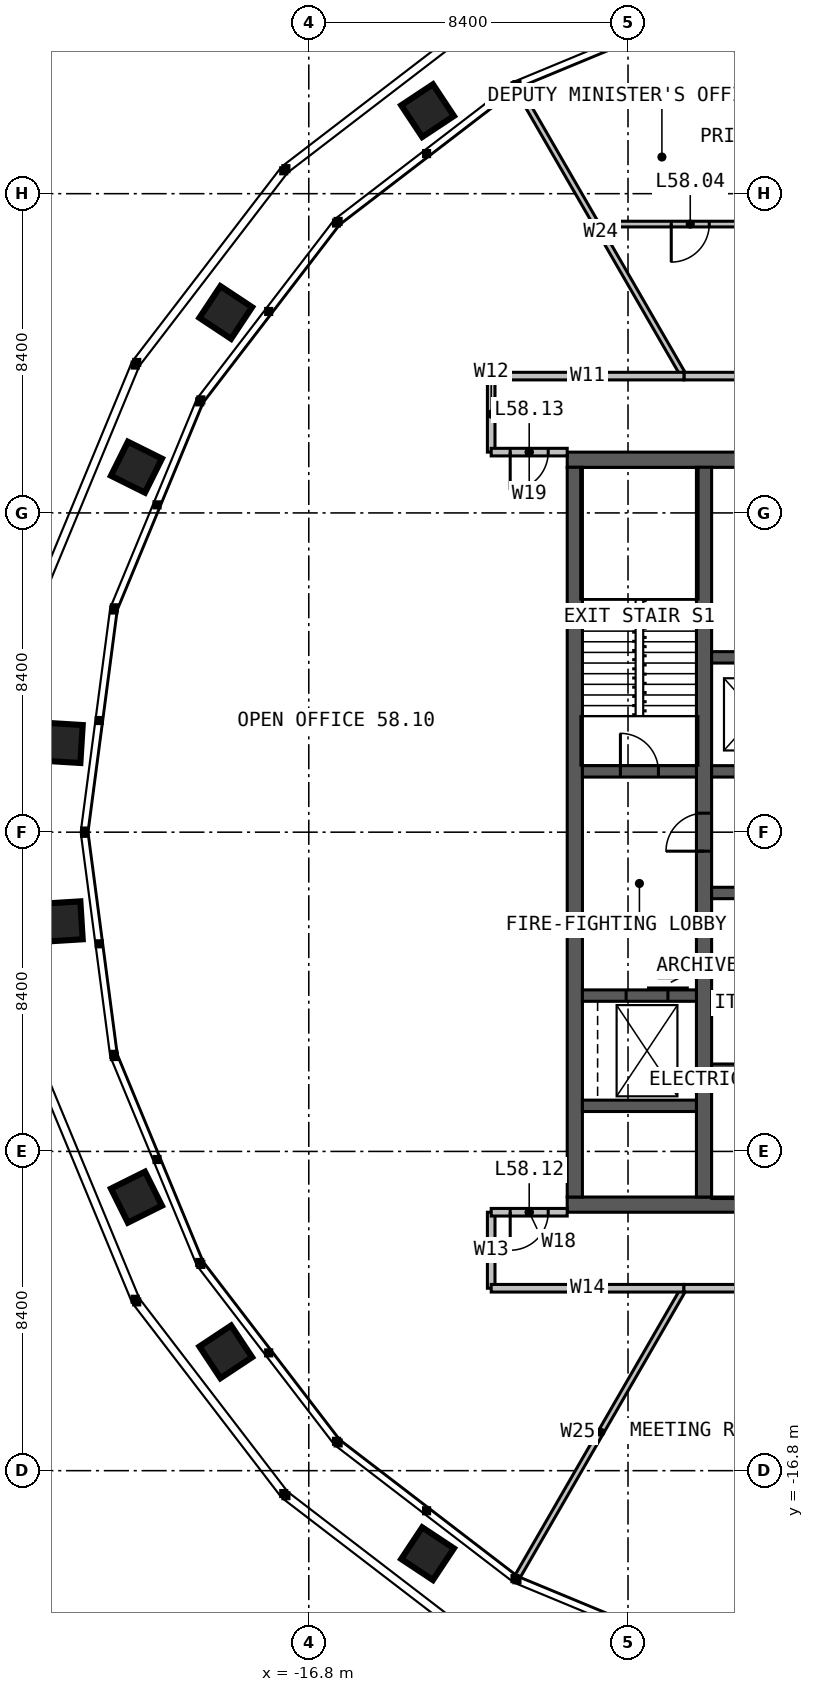
"""IFC4 building model, lengths in metres.
Left out: names, types, materials, properties, quantities, classifications, styles, units other than length and angle.
Written with IfcOpenShell. Run it as: python <this file> out.ifc"""

import sys

from ifc_helpers import new_model, si_unit, direction, frame, frame_2d, origin, place, context, subcontext, project, spatial, rectangle, extrude, element, fill, save


model = new_model("IFC4")
c1 = context("Model", 3, precision=1e-05, world=origin(), true_north=direction((0.0, 1.0)))
c2 = subcontext(c1, "Body", "Model", "MODEL_VIEW")
j1 = project(units=[si_unit("LENGTHUNIT", "METRE"), si_unit("PLANEANGLEUNIT", "RADIAN")], contexts=[c1])
p1 = place(None, origin())
s1 = spatial("IfcSite", under=j1, at=p1, CompositionType="ELEMENT")
p2 = place(p1, origin())
s2 = spatial("IfcBuilding", under=s1, at=p2, CompositionType="ELEMENT")
p3 = place(p2, frame((0.0, 0.0, 240.0)))
s3 = spatial("IfcBuildingStorey", under=s2, at=p3, CompositionType="ELEMENT", Elevation=240.0)
p4 = place(p3, frame((-10.0, 9.8, 0.0), z_axis=(0.0, 0.0, 1.0), x_axis=(1.0, 0.0, 0.0)))
e1 = element("IfcWall", 1, at=p4, inside=s3, PredefinedType="SOLIDWALL", context=c2, shape_type="SweptSolid", body=[
    extrude(rectangle(XDim=20.0, YDim=0.4, at=frame_2d((10.0, 0.0))), origin(), (0.0, 0.0, 1.0), 4.0),
])
p5 = place(p4, frame((9.4, 0.0, 0.0)))
e2 = element("IfcOpeningElement", 2, at=p5, cuts=e1, PredefinedType="OPENING", context=c2, shape_type="SweptSolid", body=[
    extrude(rectangle(XDim=1.2, YDim=2.2, at=frame_2d((0.6, 1.1))), frame((0.0, 0.21, 0.0), z_axis=(0.0, -1.0, 0.0), x_axis=(1.0, 0.0, 0.0)), (0.0, 0.0, 1.0), 0.42),
])
p6 = place(p3, frame((10.0, -9.8, 0.0), z_axis=(0.0, 0.0, 1.0), x_axis=(-1.0, 0.0, 0.0)))
e3 = element("IfcWall", 3, at=p6, inside=s3, PredefinedType="SOLIDWALL", context=c2, shape_type="SweptSolid", body=[
    extrude(rectangle(XDim=20.0, YDim=0.4, at=frame_2d((10.0, 0.0))), origin(), (0.0, 0.0, 1.0), 4.0),
])
p7 = place(p6, frame((6.875, 0.0, 0.0)))
e4 = element("IfcOpeningElement", 4, at=p7, cuts=e3, PredefinedType="OPENING", context=c2, shape_type="SweptSolid", body=[
    extrude(rectangle(XDim=1.2, YDim=2.2, at=frame_2d((0.6, 1.1))), frame((0.0, 0.21, 0.0), z_axis=(0.0, -1.0, 0.0), x_axis=(1.0, 0.0, 0.0)), (0.0, 0.0, 1.0), 0.42),
])
p8 = place(p3, frame((-9.8, 9.6, 0.0), z_axis=(0.0, 0.0, 1.0), x_axis=(0.0, -1.0, 0.0)))
e5 = element("IfcWall", 5, at=p8, inside=s3, PredefinedType="SOLIDWALL", context=c2, shape_type="SweptSolid", body=[
    extrude(rectangle(XDim=19.2, YDim=0.4, at=frame_2d((9.6, 0.0))), origin(), (0.0, 0.0, 1.0), 4.0),
])
p9 = place(p3, frame((-6.4, -9.6, 0.0), z_axis=(0.0, 0.0, 1.0), x_axis=(0.0, 1.0, 0.0)))
e6 = element("IfcWall", 6, at=p9, inside=s3, PredefinedType="SOLIDWALL", context=c2, shape_type="SweptSolid", body=[
    extrude(rectangle(XDim=19.2, YDim=0.4, at=frame_2d((9.6, 0.0))), origin(), (0.0, 0.0, 1.0), 4.0),
])
p10 = place(p9, frame((9.1, 0.0, 0.0)))
e7 = element("IfcOpeningElement", 7, at=p10, cuts=e6, PredefinedType="OPENING", context=c2, shape_type="SweptSolid", body=[
    extrude(rectangle(XDim=1.0, YDim=2.2, at=frame_2d((0.5, 1.1))), frame((0.0, 0.21, 0.0), z_axis=(0.0, -1.0, 0.0), x_axis=(1.0, 0.0, 0.0)), (0.0, 0.0, 1.0), 0.42),
])
p11 = place(p3, frame((-6.2, 1.6, 0.0), z_axis=(0.0, 0.0, 1.0), x_axis=(1.0, 0.0, 0.0)))
e8 = element("IfcWall", 8, at=p11, inside=s3, PredefinedType="SOLIDWALL", context=c2, shape_type="SweptSolid", body=[
    extrude(rectangle(XDim=4.85, YDim=0.3, at=frame_2d((2.425, 0.0))), origin(), (0.0, 0.0, 1.0), 4.0),
])
p12 = place(p11, frame((0.625, 0.0, 0.0)))
e9 = element("IfcOpeningElement", 9, at=p12, cuts=e8, PredefinedType="OPENING", context=c2, shape_type="SweptSolid", body=[
    extrude(rectangle(XDim=1.1, YDim=2.2, at=frame_2d((0.55, 1.1))), frame((0.0, 0.16, 0.0), z_axis=(0.0, -1.0, 0.0), x_axis=(1.0, 0.0, 0.0)), (0.0, 0.0, 1.0), 0.32),
])
p13 = place(p11, frame((3.15, 0.0, 0.0)))
e10 = element("IfcOpeningElement", 10, at=p13, cuts=e8, PredefinedType="OPENING", context=c2, shape_type="SweptSolid", body=[
    extrude(rectangle(XDim=1.1, YDim=2.2, at=frame_2d((0.55, 1.1))), frame((0.0, 0.16, 0.0), z_axis=(0.0, -1.0, 0.0), x_axis=(1.0, 0.0, 0.0)), (0.0, 0.0, 1.0), 0.32),
])
p14 = place(p3, frame((-6.2, 4.6, 0.0), z_axis=(0.0, 0.0, 1.0), x_axis=(1.0, 0.0, 0.0)))
e11 = element("IfcWall", 11, at=p14, inside=s3, PredefinedType="SOLIDWALL", context=c2, shape_type="SweptSolid", body=[
    extrude(rectangle(XDim=4.85, YDim=0.3, at=frame_2d((2.425, 0.0))), origin(), (0.0, 0.0, 1.0), 4.0),
])
p15 = place(p3, frame((-6.2, -1.6, 0.0), z_axis=(0.0, 0.0, 1.0), x_axis=(1.0, 0.0, 0.0)))
e12 = element("IfcWall", 12, at=p15, inside=s3, PredefinedType="SOLIDWALL", context=c2, shape_type="SweptSolid", body=[
    extrude(rectangle(XDim=7.4, YDim=0.3, at=frame_2d((3.7, 0.0))), origin(), (0.0, 0.0, 1.0), 4.0),
])
p16 = place(p15, frame((0.675, 0.0, 0.0)))
e13 = element("IfcOpeningElement", 13, at=p16, cuts=e12, PredefinedType="OPENING", context=c2, shape_type="SweptSolid", body=[
    extrude(rectangle(XDim=1.0, YDim=2.2, at=frame_2d((0.5, 1.1))), frame((0.0, 0.16, 0.0), z_axis=(0.0, -1.0, 0.0), x_axis=(1.0, 0.0, 0.0)), (0.0, 0.0, 1.0), 0.32),
])
p17 = place(p15, frame((2.225, 0.0, 0.0)))
e14 = element("IfcOpeningElement", 14, at=p17, cuts=e12, PredefinedType="OPENING", context=c2, shape_type="SweptSolid", body=[
    extrude(rectangle(XDim=1.0, YDim=2.2, at=frame_2d((0.5, 1.1))), frame((0.0, 0.16, 0.0), z_axis=(0.0, -1.0, 0.0), x_axis=(1.0, 0.0, 0.0)), (0.0, 0.0, 1.0), 0.32),
])
p18 = place(p15, frame((3.695, 0.0, 0.0)))
e15 = element("IfcOpeningElement", 15, at=p18, cuts=e12, PredefinedType="OPENING", context=c2, shape_type="SweptSolid", body=[
    extrude(rectangle(XDim=1.0, YDim=2.2, at=frame_2d((0.5, 1.1))), frame((0.0, 0.16, 0.0), z_axis=(0.0, -1.0, 0.0), x_axis=(1.0, 0.0, 0.0)), (0.0, 0.0, 1.0), 0.32),
])
p19 = place(p3, frame((-6.2, -4.6, 0.0), z_axis=(0.0, 0.0, 1.0), x_axis=(1.0, 0.0, 0.0)))
e16 = element("IfcWall", 16, at=p19, inside=s3, PredefinedType="SOLIDWALL", context=c2, shape_type="SweptSolid", body=[
    extrude(rectangle(XDim=7.4, YDim=0.3, at=frame_2d((3.7, 0.0))), origin(), (0.0, 0.0, 1.0), 4.0),
])
p20 = place(p3, frame((-6.2, -6.2, 0.0), z_axis=(0.0, 0.0, 1.0), x_axis=(1.0, 0.0, 0.0)))
e17 = element("IfcWall", 17, at=p20, inside=s3, PredefinedType="SOLIDWALL", context=c2, shape_type="SweptSolid", body=[
    extrude(rectangle(XDim=7.4, YDim=0.2, at=frame_2d((3.7, 0.0))), origin(), (0.0, 0.0, 1.0), 4.0),
])
p21 = place(p3, frame((-9.6, 1.6, 0.0), z_axis=(0.0, 0.0, 1.0), x_axis=(1.0, 0.0, 0.0)))
e18 = element("IfcWall", 18, at=p21, inside=s3, PredefinedType="SOLIDWALL", context=c2, shape_type="SweptSolid", body=[
    extrude(rectangle(XDim=3.0, YDim=0.3, at=frame_2d((1.5, 0.0))), origin(), (0.0, 0.0, 1.0), 4.0),
])
p22 = place(p21, frame((1.0, 0.0, 0.0)))
e19 = element("IfcOpeningElement", 19, at=p22, cuts=e18, PredefinedType="OPENING", context=c2, shape_type="SweptSolid", body=[
    extrude(rectangle(XDim=1.0, YDim=2.2, at=frame_2d((0.5, 1.1))), frame((0.0, 0.16, 0.0), z_axis=(0.0, -1.0, 0.0), x_axis=(1.0, 0.0, 0.0)), (0.0, 0.0, 1.0), 0.32),
])
p23 = place(p3, frame((-9.6, -4.3, 0.0), z_axis=(0.0, 0.0, 1.0), x_axis=(1.0, 0.0, 0.0)))
e20 = element("IfcWall", 20, at=p23, inside=s3, PredefinedType="SOLIDWALL", context=c2, shape_type="SweptSolid", body=[
    extrude(rectangle(XDim=3.0, YDim=0.3, at=frame_2d((1.5, 0.0))), origin(), (0.0, 0.0, 1.0), 4.0),
])
p24 = place(p23, frame((1.15, 0.0, 0.0)))
e21 = element("IfcOpeningElement", 21, at=p24, cuts=e20, PredefinedType="OPENING", context=c2, shape_type="SweptSolid", body=[
    extrude(rectangle(XDim=1.1, YDim=2.2, at=frame_2d((0.55, 1.1))), frame((0.0, 0.16, 0.0), z_axis=(0.0, -1.0, 0.0), x_axis=(1.0, 0.0, 0.0)), (0.0, 0.0, 1.0), 0.32),
])
p25 = place(p3, frame((-9.6, -7.2, 0.0), z_axis=(0.0, 0.0, 1.0), x_axis=(1.0, 0.0, 0.0)))
e22 = element("IfcWall", 22, at=p25, inside=s3, PredefinedType="SOLIDWALL", context=c2, shape_type="SweptSolid", body=[
    extrude(rectangle(XDim=3.0, YDim=0.3, at=frame_2d((1.5, 0.0))), origin(), (0.0, 0.0, 1.0), 4.0),
])
for number, where, z_axis, x_axis in (
    (23, (-6.928, 12.0, 0.0), (0.0, 0.0, 1.0), (-0.5, 0.866, 0.0)),
    (24, (-6.928, -12.0, 0.0), (0.0, 0.0, 1.0), (-0.5, -0.866, 0.0)),
):
    element("IfcWall", number, at=place(p3, frame(where, z_axis=z_axis, x_axis=x_axis)), inside=s3, PredefinedType="PARTITIONING", context=c2, shape_type="SweptSolid", body=[
        extrude(rectangle(XDim=8.753, YDim=0.15, at=frame_2d((4.376, 0.0))), origin(), (0.0, 0.0, 1.0), 2.79),
    ])
p26 = place(p3, frame((9.238, 16.0, 0.0), z_axis=(0.0, 0.0, 1.0), x_axis=(-1.0, 0.0, 0.0)))
e25 = element("IfcWall", 25, at=p26, inside=s3, PredefinedType="PARTITIONING", context=c2, shape_type="SweptSolid", body=[
    extrude(rectangle(XDim=18.475, YDim=0.15, at=frame_2d((9.238, 0.0))), origin(), (0.0, 0.0, 1.0), 2.79),
])
p27 = place(p26, frame((1.975, 0.0, 0.0)))
e26 = element("IfcOpeningElement", 26, at=p27, cuts=e25, PredefinedType="OPENING", context=c2, shape_type="SweptSolid", body=[
    extrude(rectangle(XDim=1.0, YDim=2.2, at=frame_2d((0.5, 1.1))), frame((0.0, 0.085, 0.0), z_axis=(0.0, -1.0, 0.0), x_axis=(1.0, 0.0, 0.0)), (0.0, 0.0, 1.0), 0.17),
])
p28 = place(p26, frame((6.594, 0.0, 0.0)))
e27 = element("IfcOpeningElement", 27, at=p28, cuts=e25, PredefinedType="OPENING", context=c2, shape_type="SweptSolid", body=[
    extrude(rectangle(XDim=1.0, YDim=2.2, at=frame_2d((0.5, 1.1))), frame((0.0, 0.085, 0.0), z_axis=(0.0, -1.0, 0.0), x_axis=(1.0, 0.0, 0.0)), (0.0, 0.0, 1.0), 0.17),
])
p29 = place(p26, frame((10.881, 0.0, 0.0)))
e28 = element("IfcOpeningElement", 28, at=p29, cuts=e25, PredefinedType="OPENING", context=c2, shape_type="SweptSolid", body=[
    extrude(rectangle(XDim=1.0, YDim=2.2, at=frame_2d((0.5, 1.1))), frame((0.0, 0.085, 0.0), z_axis=(0.0, -1.0, 0.0), x_axis=(1.0, 0.0, 0.0)), (0.0, 0.0, 1.0), 0.17),
])
p30 = place(p26, frame((15.5, 0.0, 0.0)))
e29 = element("IfcOpeningElement", 29, at=p30, cuts=e25, PredefinedType="OPENING", context=c2, shape_type="SweptSolid", body=[
    extrude(rectangle(XDim=1.0, YDim=2.2, at=frame_2d((0.5, 1.1))), frame((0.0, 0.085, 0.0), z_axis=(0.0, -1.0, 0.0), x_axis=(1.0, 0.0, 0.0)), (0.0, 0.0, 1.0), 0.17),
])
p31 = place(p3, frame((-4.287, 16.0, 0.0), z_axis=(0.0, 0.0, 1.0), x_axis=(-0.258846444451, 0.965918484239, 0.0)))
e30 = element("IfcWall", 30, at=p31, inside=s3, PredefinedType="PARTITIONING", context=c2, shape_type="SweptSolid", body=[
    extrude(rectangle(XDim=6.045, YDim=0.15, at=frame_2d((3.022, 0.0))), origin(), (0.0, 0.0, 1.0), 2.79),
])
p32 = place(p3, frame((6.928, 12.0, 0.0), z_axis=(0.0, 0.0, 1.0), x_axis=(-1.0, 0.0, 0.0)))
e31 = element("IfcWall", 31, at=p32, inside=s3, PredefinedType="PARTITIONING", context=c2, shape_type="SweptSolid", body=[
    extrude(rectangle(XDim=13.856, YDim=0.2, at=frame_2d((6.928, 0.0))), origin(), (0.0, 0.0, 1.0), 3.8),
])
p33 = place(p32, frame((6.028, 0.0, 0.0)))
e32 = element("IfcOpeningElement", 32, at=p33, cuts=e31, PredefinedType="OPENING", context=c2, shape_type="SweptSolid", body=[
    extrude(rectangle(XDim=1.8, YDim=2.2, at=frame_2d((0.9, 1.1))), frame((0.0, 0.11, 0.0), z_axis=(0.0, -1.0, 0.0), x_axis=(1.0, 0.0, 0.0)), (0.0, 0.0, 1.0), 0.22),
])
p34 = place(p3, frame((-6.928, 12.0, 0.0), z_axis=(0.0, 0.0, 1.0), x_axis=(-1.0, 0.0, 0.0)))
e33 = element("IfcWall", 33, at=p34, inside=s3, PredefinedType="PARTITIONING", context=c2, shape_type="SweptSolid", body=[
    extrude(rectangle(XDim=5.072, YDim=0.2, at=frame_2d((2.536, 0.0))), origin(), (0.0, 0.0, 1.0), 3.8),
])
for number, where, z_axis, x_axis in (
    (34, (-12.0, 12.0, 0.0), (0.0, 0.0, 1.0), (0.0, -1.0, 0.0)),
    (35, (-12.0, -10.0, 0.0), (0.0, 0.0, 1.0), (0.0, -1.0, 0.0)),
):
    element("IfcWall", number, at=place(p3, frame(where, z_axis=z_axis, x_axis=x_axis)), inside=s3, PredefinedType="PARTITIONING", context=c2, shape_type="SweptSolid", body=[
        extrude(rectangle(XDim=2.0, YDim=0.2, at=frame_2d((1.0, 0.0))), origin(), (0.0, 0.0, 1.0), 3.8),
    ])
p35 = place(p3, frame((-12.0, -12.0, 0.0), z_axis=(0.0, 0.0, 1.0), x_axis=(1.0, 0.0, 0.0)))
e36 = element("IfcWall", 36, at=p35, inside=s3, PredefinedType="PARTITIONING", context=c2, shape_type="SweptSolid", body=[
    extrude(rectangle(XDim=5.072, YDim=0.2, at=frame_2d((2.536, 0.0))), origin(), (0.0, 0.0, 1.0), 3.8),
])
p36 = place(p3, frame((-6.928, -12.0, 0.0), z_axis=(0.0, 0.0, 1.0), x_axis=(1.0, 0.0, 0.0)))
e37 = element("IfcWall", 37, at=p36, inside=s3, PredefinedType="PARTITIONING", context=c2, shape_type="SweptSolid", body=[
    extrude(rectangle(XDim=5.334, YDim=0.2, at=frame_2d((2.667, 0.0))), origin(), (0.0, 0.0, 1.0), 3.8),
])
p37 = place(p36, frame((2.167, 0.0, 0.0)))
e38 = element("IfcOpeningElement", 38, at=p37, cuts=e37, PredefinedType="OPENING", context=c2, shape_type="SweptSolid", body=[
    extrude(rectangle(XDim=1.0, YDim=2.2, at=frame_2d((0.5, 1.1))), frame((0.0, 0.11, 0.0), z_axis=(0.0, -1.0, 0.0), x_axis=(1.0, 0.0, 0.0)), (0.0, 0.0, 1.0), 0.22),
])
p38 = place(p3, frame((-10.0, -10.0, 0.0), z_axis=(0.0, 0.0, 1.0), x_axis=(-1.0, 0.0, 0.0)))
e39 = element("IfcWall", 39, at=p38, inside=s3, PredefinedType="PARTITIONING", context=c2, shape_type="SweptSolid", body=[
    extrude(rectangle(XDim=2.0, YDim=0.2, at=frame_2d((1.0, 0.0))), origin(), (0.0, 0.0, 1.0), 3.8),
])
p39 = place(p38, frame((0.5, 0.0, 0.0)))
e40 = element("IfcOpeningElement", 40, at=p39, cuts=e39, PredefinedType="OPENING", context=c2, shape_type="SweptSolid", body=[
    extrude(rectangle(XDim=1.0, YDim=2.2, at=frame_2d((0.5, 1.1))), frame((0.0, 0.11, 0.0), z_axis=(0.0, -1.0, 0.0), x_axis=(1.0, 0.0, 0.0)), (0.0, 0.0, 1.0), 0.22),
])
p40 = place(p3, frame((-10.0, 10.0, 0.0), z_axis=(0.0, 0.0, 1.0), x_axis=(-1.0, 0.0, 0.0)))
e41 = element("IfcWall", 41, at=p40, inside=s3, PredefinedType="PARTITIONING", context=c2, shape_type="SweptSolid", body=[
    extrude(rectangle(XDim=2.0, YDim=0.2, at=frame_2d((1.0, 0.0))), origin(), (0.0, 0.0, 1.0), 3.8),
])
p41 = place(p40, frame((0.5, 0.0, 0.0)))
e42 = element("IfcOpeningElement", 42, at=p41, cuts=e41, PredefinedType="OPENING", context=c2, shape_type="SweptSolid", body=[
    extrude(rectangle(XDim=1.0, YDim=2.2, at=frame_2d((0.5, 1.1))), frame((0.0, 0.11, 0.0), z_axis=(0.0, -1.0, 0.0), x_axis=(1.0, 0.0, 0.0)), (0.0, 0.0, 1.0), 0.22),
])
p42 = place(p10, origin())
e43 = element("IfcDoor", 43, at=p42, inside=s3, OperationType="SINGLE_SWING_LEFT", PredefinedType="DOOR", context=c2, shape_type="SweptSolid", body=[
    extrude(rectangle(XDim=1.0, YDim=2.2, at=frame_2d((0.5, 1.1))), frame((0.0, 0.025, 0.0), z_axis=(0.0, -1.0, 0.0), x_axis=(1.0, 0.0, 0.0)), (0.0, 0.0, 1.0), 0.05),
])
fill(e7, e43)
p43 = place(p22, origin())
e44 = element("IfcDoor", 44, at=p43, inside=s3, OperationType="SINGLE_SWING_LEFT", PredefinedType="DOOR", context=c2, shape_type="SweptSolid", body=[
    extrude(rectangle(XDim=1.0, YDim=2.2, at=frame_2d((0.5, 1.1))), frame((0.0, 0.025, 0.0), z_axis=(0.0, -1.0, 0.0), x_axis=(1.0, 0.0, 0.0)), (0.0, 0.0, 1.0), 0.05),
])
fill(e19, e44)
p44 = place(p24, origin())
e45 = element("IfcDoor", 45, at=p44, inside=s3, OperationType="SLIDING_TO_LEFT", PredefinedType="DOOR", context=c2, shape_type="SweptSolid", body=[
    extrude(rectangle(XDim=1.1, YDim=2.2, at=frame_2d((0.55, 1.1))), frame((0.0, 0.025, 0.0), z_axis=(0.0, -1.0, 0.0), x_axis=(1.0, 0.0, 0.0)), (0.0, 0.0, 1.0), 0.05),
])
fill(e21, e45)
p45 = place(p30, origin())
e46 = element("IfcDoor", 46, at=p45, inside=s3, OperationType="SINGLE_SWING_RIGHT", PredefinedType="DOOR", context=c2, shape_type="SweptSolid", body=[
    extrude(rectangle(XDim=1.0, YDim=2.2, at=frame_2d((0.5, 1.1))), frame((0.0, 0.025, 0.0), z_axis=(0.0, -1.0, 0.0), x_axis=(1.0, 0.0, 0.0)), (0.0, 0.0, 1.0), 0.05),
])
fill(e29, e46)
p46 = place(p39, origin())
e47 = element("IfcDoor", 47, at=p46, inside=s3, OperationType="SINGLE_SWING_RIGHT", PredefinedType="DOOR", context=c2, shape_type="SweptSolid", body=[
    extrude(rectangle(XDim=1.0, YDim=2.2, at=frame_2d((0.5, 1.1))), frame((0.0, 0.025, 0.0), z_axis=(0.0, -1.0, 0.0), x_axis=(1.0, 0.0, 0.0)), (0.0, 0.0, 1.0), 0.05),
])
fill(e40, e47)
p47 = place(p41, origin())
e48 = element("IfcDoor", 48, at=p47, inside=s3, OperationType="SINGLE_SWING_RIGHT", PredefinedType="DOOR", context=c2, shape_type="SweptSolid", body=[
    extrude(rectangle(XDim=1.0, YDim=2.2, at=frame_2d((0.5, 1.1))), frame((0.0, 0.025, 0.0), z_axis=(0.0, -1.0, 0.0), x_axis=(1.0, 0.0, 0.0)), (0.0, 0.0, 1.0), 0.05),
])
fill(e42, e48)
save(model, sys.argv[1])
